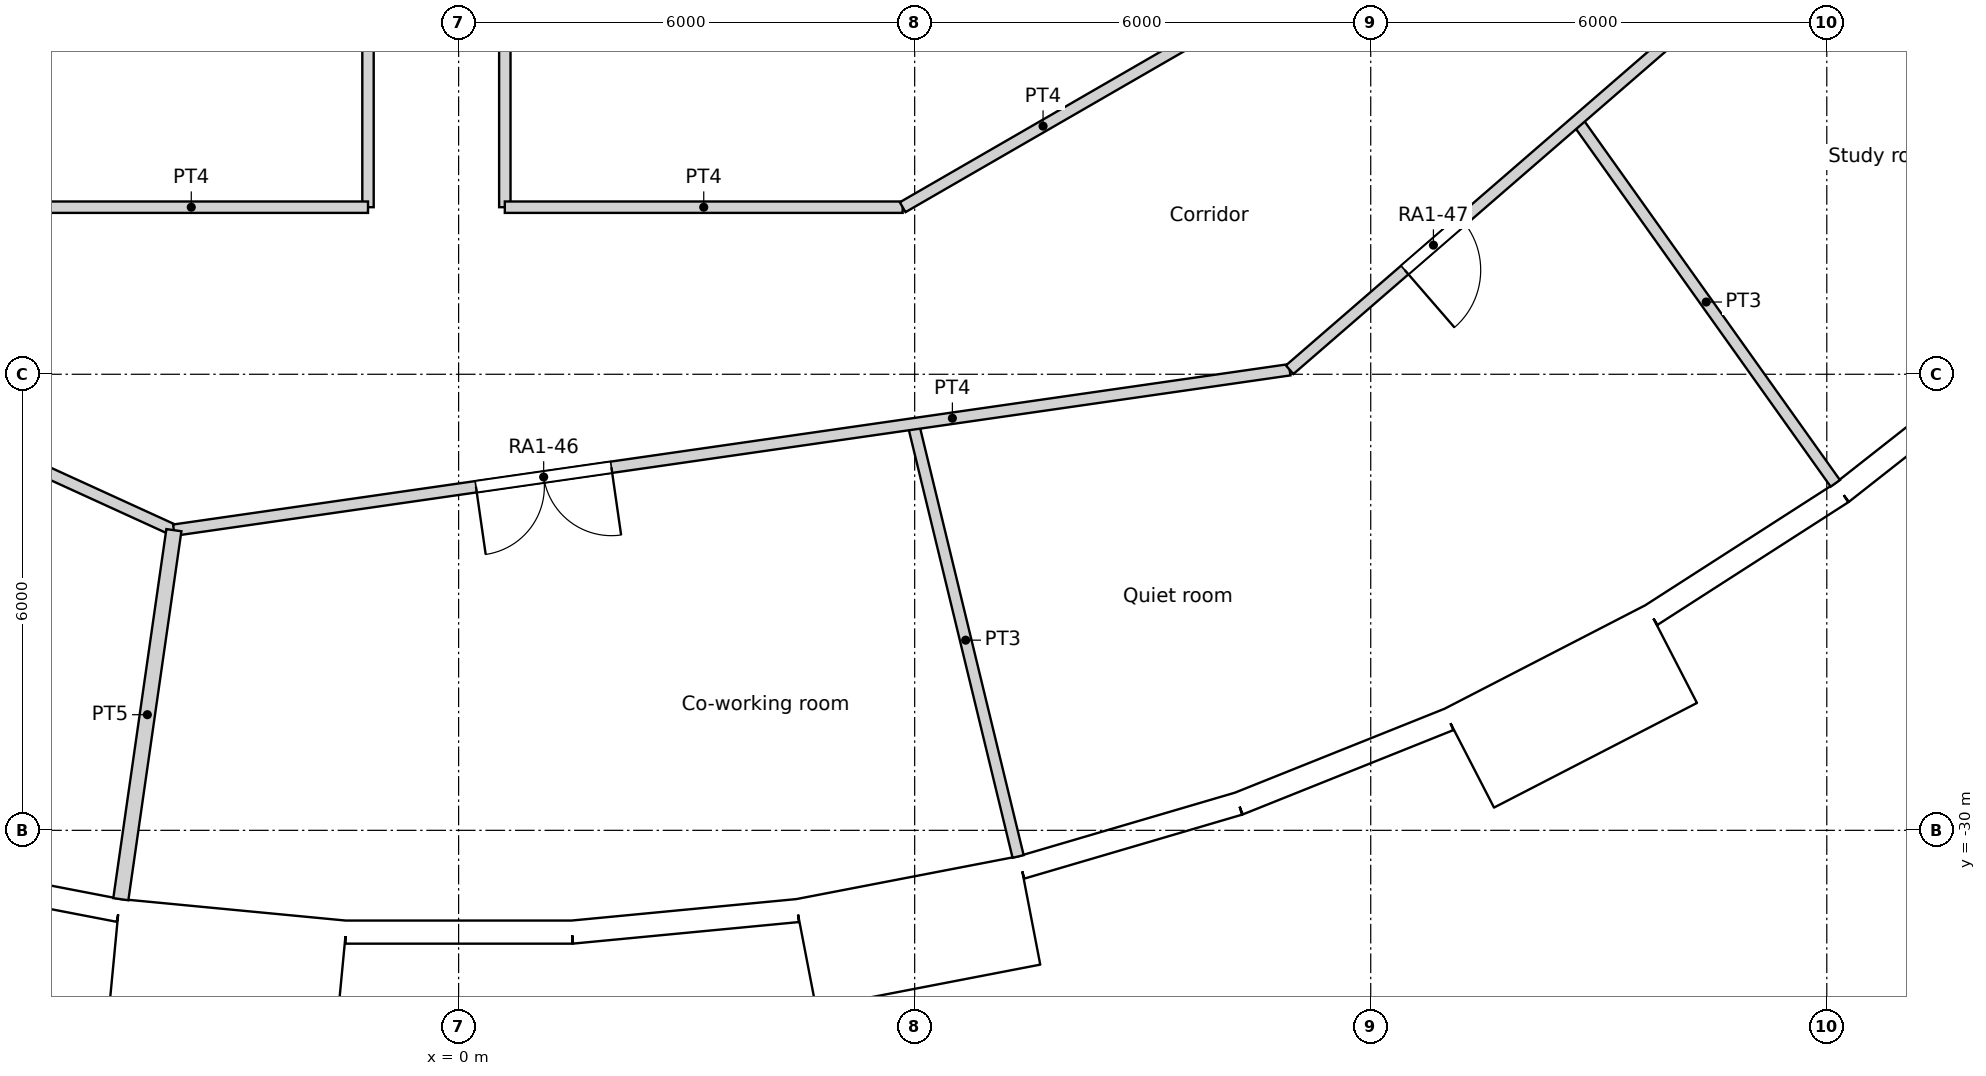
"""IFC4 building model, lengths in metres.
Left out: names, types, materials, properties, quantities, classifications, styles, units other than length and angle.
Written with IfcOpenShell. Run it as: python <this file> out.ifc"""

import sys

from ifc_helpers import new_model, si_unit, direction, frame, frame_2d, origin, origin_2d, place, context, subcontext, project, spatial, rectangle, circle, extrude, element, fill, save


model = new_model("IFC4")
c1 = context("Model", 3, precision=1e-05, world=origin(), true_north=direction((0.0, 1.0)))
c2 = subcontext(c1, "Body", "Model", "MODEL_VIEW")
j1 = project(units=[si_unit("LENGTHUNIT", "METRE"), si_unit("PLANEANGLEUNIT", "RADIAN")], contexts=[c1])
p1 = place(None, origin())
s1 = spatial("IfcSite", under=j1, at=p1, CompositionType="ELEMENT")
p2 = place(p1, origin())
s2 = spatial("IfcBuilding", under=s1, at=p2, CompositionType="ELEMENT")
p3 = place(p2, frame((0.0, 0.0, 28.2)))
s3 = spatial("IfcBuildingStorey", under=s2, at=p3, CompositionType="ELEMENT", Elevation=28.2)
for number, where, z_axis, x_axis in (
    (1, (-4.309, -29.966, 0.0), (0.0, 0.0, 1.0), (1.0, 0.0, 0.0)),
    (2, (1.44, -30.24, 0.0), (0.0, 0.0, 1.0), (1.0, 0.0, 0.0)),
    (3, (7.137, -29.421, 0.0), (0.0, 0.0, 1.0), (1.0, 0.0, 0.0)),
    (4, (12.576, -27.539, 0.0), (0.0, 0.0, 1.0), (1.0, 0.0, 0.0)),
    (5, (17.561, -24.661, 0.0), (0.0, 0.0, 1.0), (1.0, 0.0, 0.0)),
):
    element("IfcColumn", number, at=place(p3, frame(where, z_axis=z_axis, x_axis=x_axis)), inside=s3, PredefinedType="COLUMN", context=c2, shape_type="SweptSolid", body=[
        extrude(circle(Radius=0.7, at=origin_2d()), origin(), (0.0, 0.0, 1.0), 3.6),
    ])
for number, where, z_axis, x_axis in (
    (6, (-1.427, -24.506, 0.0), (0.0, 0.0, 1.0), (1.0, 0.0, 0.0)),
    (7, (4.263, -24.175, 0.0), (0.0, 0.0, 1.0), (1.0, 0.0, 0.0)),
    (8, (9.723, -22.54, 0.0), (0.0, 0.0, 1.0), (1.0, 0.0, 0.0)),
    (9, (14.659, -19.69, 0.0), (0.0, 0.0, 1.0), (1.0, 0.0, 0.0)),
):
    element("IfcColumn", number, at=place(p3, frame(where, z_axis=z_axis, x_axis=x_axis)), inside=s3, PredefinedType="COLUMN", context=c2, shape_type="SweptSolid", body=[
        extrude(circle(Radius=0.75, at=origin_2d()), origin(), (0.0, 0.0, 1.0), 3.6),
    ])
p4 = place(p3, frame((-7.397, -30.49, 0.0), z_axis=(0.0, 0.0, 1.0), x_axis=(0.981924535406, -0.189272836848, 0.0)))
e10 = element("IfcWall", 10, at=p4, inside=s3, PredefinedType="SOLIDWALL", context=c2, shape_type="SweptSolid", body=[
    extrude(rectangle(XDim=2.98, YDim=0.3, at=frame_2d((1.49, 0.0))), origin(), (0.0, 0.0, 1.0), 3.15),
])
p5 = place(p4, frame((1.49, 0.0, 1.55)))
e11 = element("IfcOpeningElement", 11, at=p5, cuts=e10, PredefinedType="OPENING", context=c2, shape_type="SweptSolid", body=[
    extrude(circle(Radius=0.9, at=origin_2d()), frame((0.0, 0.16, 0.0), z_axis=(0.0, -1.0, 0.0), x_axis=(1.0, 0.0, 0.0)), (0.0, 0.0, 1.0), 0.32),
])
p6 = place(p3, frame((-4.527, -31.627, -0.45), z_axis=(0.0, 0.0, 1.0), x_axis=(0.995472768558, -0.09504718333, 0.0)))
e12 = element("IfcWall", 12, at=p6, inside=s3, PredefinedType="ELEMENTEDWALL", context=c2, shape_type="SweptSolid", body=[
    extrude(rectangle(XDim=3.0, YDim=1.45, at=frame_2d((1.5, 0.0))), origin(), (0.0, 0.0, 1.0), 3.6),
])
p7 = place(p6, frame((1.5, 0.0, 2.0)))
e13 = element("IfcOpeningElement", 13, at=p7, cuts=e12, PredefinedType="OPENING", context=c2, shape_type="SweptSolid", body=[
    extrude(circle(Radius=0.9, at=origin_2d()), frame((0.0, 0.735, 0.0), z_axis=(0.0, -1.0, 0.0), x_axis=(1.0, 0.0, 0.0)), (0.0, 0.0, 1.0), 1.47),
])
p8 = place(p3, frame((-1.487, -31.339, 0.0), z_axis=(0.0, 0.0, 1.0), x_axis=(1.0, 0.0, 0.0)))
e14 = element("IfcWall", 14, at=p8, inside=s3, PredefinedType="SOLIDWALL", context=c2, shape_type="SweptSolid", body=[
    extrude(rectangle(XDim=2.98, YDim=0.3, at=frame_2d((1.49, 0.0))), origin(), (0.0, 0.0, 1.0), 3.15),
])
p9 = place(p8, frame((1.49, 0.0, 1.55)))
e15 = element("IfcOpeningElement", 15, at=p9, cuts=e14, PredefinedType="OPENING", context=c2, shape_type="SweptSolid", body=[
    extrude(circle(Radius=0.9, at=origin_2d()), frame((0.0, 0.16, 0.0), z_axis=(0.0, -1.0, 0.0), x_axis=(1.0, 0.0, 0.0)), (0.0, 0.0, 1.0), 0.32),
])
p10 = place(p3, frame((1.493, -31.339, 0.0), z_axis=(0.0, 0.0, 1.0), x_axis=(0.995472611385, 0.095048829468, 0.0)))
e16 = element("IfcWall", 16, at=p10, inside=s3, PredefinedType="SOLIDWALL", context=c2, shape_type="SweptSolid", body=[
    extrude(rectangle(XDim=2.979, YDim=0.3, at=frame_2d((1.49, 0.0))), origin(), (0.0, 0.0, 1.0), 3.15),
])
p11 = place(p10, frame((1.49, 0.0, 1.55)))
e17 = element("IfcOpeningElement", 17, at=p11, cuts=e16, PredefinedType="OPENING", context=c2, shape_type="SweptSolid", body=[
    extrude(circle(Radius=0.9, at=origin_2d()), frame((0.0, 0.16, 0.0), z_axis=(0.0, -1.0, 0.0), x_axis=(1.0, 0.0, 0.0)), (0.0, 0.0, 1.0), 0.32),
])
p12 = place(p3, frame((4.567, -31.621, -0.45), z_axis=(0.0, 0.0, 1.0), x_axis=(0.981921602273, 0.189288052949, 0.0)))
e18 = element("IfcWall", 18, at=p12, inside=s3, PredefinedType="ELEMENTEDWALL", context=c2, shape_type="SweptSolid", body=[
    extrude(rectangle(XDim=3.0, YDim=1.45, at=frame_2d((1.5, 0.0))), origin(), (0.0, 0.0, 1.0), 3.6),
])
p13 = place(p12, frame((1.5, 0.0, 2.0)))
e19 = element("IfcOpeningElement", 19, at=p13, cuts=e18, PredefinedType="OPENING", context=c2, shape_type="SweptSolid", body=[
    extrude(circle(Radius=0.9, at=origin_2d()), frame((0.0, 0.735, 0.0), z_axis=(0.0, -1.0, 0.0), x_axis=(1.0, 0.0, 0.0)), (0.0, 0.0, 1.0), 1.47),
])
p14 = place(p3, frame((7.403, -30.488, 0.0), z_axis=(0.0, 0.0, 1.0), x_axis=(0.959501085144, 0.281704930036, 0.0)))
e20 = element("IfcWall", 20, at=p14, inside=s3, PredefinedType="SOLIDWALL", context=c2, shape_type="SweptSolid", body=[
    extrude(rectangle(XDim=2.979, YDim=0.3, at=frame_2d((1.49, 0.0))), origin(), (0.0, 0.0, 1.0), 3.15),
])
p15 = place(p14, frame((1.49, 0.0, 1.55)))
e21 = element("IfcOpeningElement", 21, at=p15, cuts=e20, PredefinedType="OPENING", context=c2, shape_type="SweptSolid", body=[
    extrude(circle(Radius=0.9, at=origin_2d()), frame((0.0, 0.16, 0.0), z_axis=(0.0, -1.0, 0.0), x_axis=(1.0, 0.0, 0.0)), (0.0, 0.0, 1.0), 0.32),
])
p16 = place(p3, frame((10.261, -29.649, 0.0), z_axis=(0.0, 0.0, 1.0), x_axis=(0.928374947, 0.371644935098, 0.0)))
e22 = element("IfcWall", 22, at=p16, inside=s3, PredefinedType="SOLIDWALL", context=c2, shape_type="SweptSolid", body=[
    extrude(rectangle(XDim=2.98, YDim=0.3, at=frame_2d((1.49, 0.0))), origin(), (0.0, 0.0, 1.0), 3.15),
])
p17 = place(p16, frame((1.49, 0.0, 1.55)))
e23 = element("IfcOpeningElement", 23, at=p17, cuts=e22, PredefinedType="OPENING", context=c2, shape_type="SweptSolid", body=[
    extrude(circle(Radius=0.9, at=origin_2d()), frame((0.0, 0.16, 0.0), z_axis=(0.0, -1.0, 0.0), x_axis=(1.0, 0.0, 0.0)), (0.0, 0.0, 1.0), 0.32),
])
p18 = place(p3, frame((13.291, -29.053, -0.45), z_axis=(0.0, 0.0, 1.0), x_axis=(0.888858064689, 0.458182650083, 0.0)))
e24 = element("IfcWall", 24, at=p18, inside=s3, PredefinedType="ELEMENTEDWALL", context=c2, shape_type="SweptSolid", body=[
    extrude(rectangle(XDim=3.0, YDim=1.45, at=frame_2d((1.5, 0.0))), origin(), (0.0, 0.0, 1.0), 3.6),
])
p19 = place(p18, frame((1.5, 0.0, 2.0)))
e25 = element("IfcOpeningElement", 25, at=p19, cuts=e24, PredefinedType="OPENING", context=c2, shape_type="SweptSolid", body=[
    extrude(circle(Radius=0.9, at=origin_2d()), frame((0.0, 0.735, 0.0), z_axis=(0.0, -1.0, 0.0), x_axis=(1.0, 0.0, 0.0)), (0.0, 0.0, 1.0), 1.47),
])
p20 = place(p3, frame((15.692, -27.168, 0.0), z_axis=(0.0, 0.0, 1.0), x_axis=(0.841260995538, 0.54062920508, 0.0)))
e26 = element("IfcWall", 26, at=p20, inside=s3, PredefinedType="SOLIDWALL", context=c2, shape_type="SweptSolid", body=[
    extrude(rectangle(XDim=2.979, YDim=0.3, at=frame_2d((1.49, 0.0))), origin(), (0.0, 0.0, 1.0), 3.15),
])
p21 = place(p20, frame((1.49, 0.0, 1.55)))
e27 = element("IfcOpeningElement", 27, at=p21, cuts=e26, PredefinedType="OPENING", context=c2, shape_type="SweptSolid", body=[
    extrude(circle(Radius=0.9, at=origin_2d()), frame((0.0, 0.16, 0.0), z_axis=(0.0, -1.0, 0.0), x_axis=(1.0, 0.0, 0.0)), (0.0, 0.0, 1.0), 0.32),
])
p22 = place(p3, frame((18.199, -25.557, 0.0), z_axis=(0.0, 0.0, 1.0), x_axis=(0.786053834673, 0.618158045322, 0.0)))
e28 = element("IfcWall", 28, at=p22, inside=s3, PredefinedType="SOLIDWALL", context=c2, shape_type="SweptSolid", body=[
    extrude(rectangle(XDim=2.979, YDim=0.3, at=frame_2d((1.49, 0.0))), origin(), (0.0, 0.0, 1.0), 3.15),
])
p23 = place(p22, frame((1.49, 0.0, 1.55)))
e29 = element("IfcOpeningElement", 29, at=p23, cuts=e28, PredefinedType="OPENING", context=c2, shape_type="SweptSolid", body=[
    extrude(circle(Radius=0.9, at=origin_2d()), frame((0.0, 0.16, 0.0), z_axis=(0.0, -1.0, 0.0), x_axis=(1.0, 0.0, 0.0)), (0.0, 0.0, 1.0), 0.32),
])
p24 = place(p3, frame((10.933, -23.94, 0.0), z_axis=(0.0, 0.0, 1.0), x_axis=(0.755770011705, 0.654837147242, 0.0)))
e30 = element("IfcWall", 30, at=p24, inside=s3, PredefinedType="PARTITIONING", context=c2, shape_type="SweptSolid", body=[
    extrude(rectangle(XDim=14.83, YDim=0.15, at=frame_2d((7.415, 0.0))), origin(), (0.0, 0.0, 1.0), 3.15),
])
p25 = place(p24, frame((2.003, 0.0, 0.0)))
e31 = element("IfcOpeningElement", 31, at=p25, cuts=e30, PredefinedType="OPENING", context=c2, shape_type="SweptSolid", body=[
    extrude(rectangle(XDim=1.0, YDim=2.04, at=frame_2d((0.5, 1.02))), frame((0.0, 0.075, 0.0), z_axis=(0.0, -1.0, 0.0), x_axis=(1.0, 0.0, 0.0)), (0.0, 0.0, 1.0), 0.15),
])
p26 = place(p3, frame((-5.842, -21.802, 0.0), z_axis=(0.0, 0.0, 1.0), x_axis=(1.0, 0.0, 0.0)))
e32 = element("IfcWall", 32, at=p26, inside=s3, PredefinedType="PARTITIONING", context=c2, shape_type="SweptSolid", body=[
    extrude(rectangle(XDim=4.65, YDim=0.15, at=frame_2d((2.325, 0.0))), origin(), (0.0, 0.0, 1.0), 3.15),
])
p27 = place(p3, frame((-1.192, -21.802, 0.0), z_axis=(0.0, 0.0, 1.0), x_axis=(0.0, 1.0, 0.0)))
e33 = element("IfcWall", 33, at=p27, inside=s3, PredefinedType="PARTITIONING", context=c2, shape_type="SweptSolid", body=[
    extrude(rectangle(XDim=10.002, YDim=0.15, at=frame_2d((5.001, 0.0))), origin(), (0.0, 0.0, 1.0), 3.15),
])
p28 = place(p3, frame((0.608, -21.802, 0.0), z_axis=(0.0, 0.0, 1.0), x_axis=(0.0, 1.0, 0.0)))
e34 = element("IfcWall", 34, at=p28, inside=s3, PredefinedType="PARTITIONING", context=c2, shape_type="SweptSolid", body=[
    extrude(rectangle(XDim=10.002, YDim=0.15, at=frame_2d((5.001, 0.0))), origin(), (0.0, 0.0, 1.0), 3.15),
])
p29 = place(p28, frame((4.526, 0.0, 0.0)))
e35 = element("IfcOpeningElement", 35, at=p29, cuts=e34, PredefinedType="OPENING", context=c2, shape_type="SweptSolid", body=[
    extrude(rectangle(XDim=0.95, YDim=2.1, at=frame_2d((0.475, 1.05))), frame((0.0, 0.075, 0.0), z_axis=(0.0, -1.0, 0.0), x_axis=(1.0, 0.0, 0.0)), (0.0, 0.0, 1.0), 0.15),
])
p30 = place(p3, frame((0.608, -21.802, 0.0), z_axis=(0.0, 0.0, 1.0), x_axis=(1.0, 0.0, 0.0)))
e36 = element("IfcWall", 36, at=p30, inside=s3, PredefinedType="PARTITIONING", context=c2, shape_type="SweptSolid", body=[
    extrude(rectangle(XDim=5.234, YDim=0.15, at=frame_2d((2.617, 0.0))), origin(), (0.0, 0.0, 1.0), 3.15),
])
p31 = place(p3, frame((5.842, -21.802, 0.0), z_axis=(0.0, 0.0, 1.0), x_axis=(0.865983505205, 0.500072563448, 0.0)))
e37 = element("IfcWall", 37, at=p31, inside=s3, PredefinedType="PARTITIONING", context=c2, shape_type="SweptSolid", body=[
    extrude(rectangle(XDim=4.265, YDim=0.15, at=frame_2d((2.133, 0.0))), origin(), (0.0, 0.0, 1.0), 3.15),
])
p32 = place(p3, frame((-17.235, -19.89, 0.0), z_axis=(0.0, 0.0, 1.0), x_axis=(0.90960889055, -0.415465601743, 0.0)))
e38 = element("IfcWall", 38, at=p32, inside=s3, PredefinedType="PARTITIONING", context=c2, shape_type="SweptSolid", body=[
    extrude(rectangle(XDim=14.829, YDim=0.15, at=frame_2d((7.415, 0.0))), origin(), (0.0, 0.0, 1.0), 3.15),
])
p33 = place(p32, frame((6.664, 0.0, 0.0)))
e39 = element("IfcOpeningElement", 39, at=p33, cuts=e38, PredefinedType="OPENING", context=c2, shape_type="SweptSolid", body=[
    extrude(rectangle(XDim=1.5, YDim=2.1, at=frame_2d((0.75, 1.05))), frame((0.0, 0.075, 0.0), z_axis=(0.0, -1.0, 0.0), x_axis=(1.0, 0.0, 0.0)), (0.0, 0.0, 1.0), 0.15),
])
p34 = place(p3, frame((-3.746, -26.051, 0.0), z_axis=(0.0, 0.0, 1.0), x_axis=(0.989823328782, 0.142301713967, 0.0)))
e40 = element("IfcWall", 40, at=p34, inside=s3, PredefinedType="PARTITIONING", context=c2, shape_type="SweptSolid", body=[
    extrude(rectangle(XDim=14.83, YDim=0.15, at=frame_2d((7.415, 0.0))), origin(), (0.0, 0.0, 1.0), 3.15),
])
p35 = place(p34, frame((4.015, 0.0, 0.0)))
e41 = element("IfcOpeningElement", 41, at=p35, cuts=e40, PredefinedType="OPENING", context=c2, shape_type="SweptSolid", body=[
    extrude(rectangle(XDim=1.8, YDim=2.1, at=frame_2d((0.9, 1.05))), frame((0.0, 0.075, 0.0), z_axis=(0.0, -1.0, 0.0), x_axis=(1.0, 0.0, 0.0)), (0.0, 0.0, 1.0), 0.15),
])
p36 = place(p3, frame((-4.444, -30.906, 0.0), z_axis=(0.0, 0.0, 1.0), x_axis=(0.142306296561, 0.989822669956, 0.0)))
e42 = element("IfcWall", 42, at=p36, inside=s3, PredefinedType="PARTITIONING", context=c2, shape_type="SweptSolid", body=[
    extrude(rectangle(XDim=4.905, YDim=0.2, at=frame_2d((2.452, 0.0))), origin(), (0.0, 0.0, 1.0), 3.15),
])
p37 = place(p3, frame((5.981, -24.652, 0.0), z_axis=(0.0, 0.0, 1.0), x_axis=(0.235644168604, -0.971839403298, 0.0)))
e43 = element("IfcWall", 43, at=p37, inside=s3, PredefinedType="PARTITIONING", context=c2, shape_type="SweptSolid", body=[
    extrude(rectangle(XDim=5.857, YDim=0.15, at=frame_2d((2.928, 0.0))), origin(), (0.0, 0.0, 1.0), 3.15),
])
p38 = place(p3, frame((14.715, -20.664, 0.0), z_axis=(0.0, 0.0, 1.0), x_axis=(0.580007254017, -0.814611309329, 0.0)))
e44 = element("IfcWall", 44, at=p38, inside=s3, PredefinedType="PARTITIONING", context=c2, shape_type="SweptSolid", body=[
    extrude(rectangle(XDim=5.857, YDim=0.15, at=frame_2d((2.928, 0.0))), origin(), (0.0, 0.0, 1.0), 3.15),
])
p39 = place(p5, origin())
e45 = element("IfcWindow", 45, at=p39, inside=s3, PartitioningType="SINGLE_PANEL", PredefinedType="WINDOW", context=c2, shape_type="SweptSolid", body=[
    extrude(circle(Radius=0.9, at=origin_2d()), frame((0.0, 0.12, 0.0), z_axis=(0.0, -1.0, 0.0), x_axis=(1.0, 0.0, 0.0)), (0.0, 0.0, 1.0), 0.1),
])
fill(e11, e45)
p40 = place(p7, origin())
e46 = element("IfcWindow", 46, at=p40, inside=s3, PartitioningType="SINGLE_PANEL", PredefinedType="WINDOW", context=c2, shape_type="SweptSolid", body=[
    extrude(circle(Radius=0.9, at=origin_2d()), frame((0.0, 0.695, 0.0), z_axis=(0.0, -1.0, 0.0), x_axis=(1.0, 0.0, 0.0)), (0.0, 0.0, 1.0), 0.1),
])
fill(e13, e46)
p41 = place(p9, origin())
e47 = element("IfcWindow", 47, at=p41, inside=s3, PartitioningType="SINGLE_PANEL", PredefinedType="WINDOW", context=c2, shape_type="SweptSolid", body=[
    extrude(circle(Radius=0.9, at=origin_2d()), frame((0.0, 0.12, 0.0), z_axis=(0.0, -1.0, 0.0), x_axis=(1.0, 0.0, 0.0)), (0.0, 0.0, 1.0), 0.1),
])
fill(e15, e47)
p42 = place(p11, origin())
e48 = element("IfcWindow", 48, at=p42, inside=s3, PartitioningType="SINGLE_PANEL", PredefinedType="WINDOW", context=c2, shape_type="SweptSolid", body=[
    extrude(circle(Radius=0.9, at=origin_2d()), frame((0.0, 0.12, 0.0), z_axis=(0.0, -1.0, 0.0), x_axis=(1.0, 0.0, 0.0)), (0.0, 0.0, 1.0), 0.1),
])
fill(e17, e48)
p43 = place(p13, origin())
e49 = element("IfcWindow", 49, at=p43, inside=s3, PartitioningType="SINGLE_PANEL", PredefinedType="WINDOW", context=c2, shape_type="SweptSolid", body=[
    extrude(circle(Radius=0.9, at=origin_2d()), frame((0.0, 0.695, 0.0), z_axis=(0.0, -1.0, 0.0), x_axis=(1.0, 0.0, 0.0)), (0.0, 0.0, 1.0), 0.1),
])
fill(e19, e49)
p44 = place(p15, origin())
e50 = element("IfcWindow", 50, at=p44, inside=s3, PartitioningType="SINGLE_PANEL", PredefinedType="WINDOW", context=c2, shape_type="SweptSolid", body=[
    extrude(circle(Radius=0.9, at=origin_2d()), frame((0.0, 0.12, 0.0), z_axis=(0.0, -1.0, 0.0), x_axis=(1.0, 0.0, 0.0)), (0.0, 0.0, 1.0), 0.1),
])
fill(e21, e50)
p45 = place(p17, origin())
e51 = element("IfcWindow", 51, at=p45, inside=s3, PartitioningType="SINGLE_PANEL", PredefinedType="WINDOW", context=c2, shape_type="SweptSolid", body=[
    extrude(circle(Radius=0.9, at=origin_2d()), frame((0.0, 0.12, 0.0), z_axis=(0.0, -1.0, 0.0), x_axis=(1.0, 0.0, 0.0)), (0.0, 0.0, 1.0), 0.1),
])
fill(e23, e51)
p46 = place(p19, origin())
e52 = element("IfcWindow", 52, at=p46, inside=s3, PartitioningType="SINGLE_PANEL", PredefinedType="WINDOW", context=c2, shape_type="SweptSolid", body=[
    extrude(circle(Radius=0.9, at=origin_2d()), frame((0.0, 0.695, 0.0), z_axis=(0.0, -1.0, 0.0), x_axis=(1.0, 0.0, 0.0)), (0.0, 0.0, 1.0), 0.1),
])
fill(e25, e52)
p47 = place(p21, origin())
e53 = element("IfcWindow", 53, at=p47, inside=s3, PartitioningType="SINGLE_PANEL", PredefinedType="WINDOW", context=c2, shape_type="SweptSolid", body=[
    extrude(circle(Radius=0.9, at=origin_2d()), frame((0.0, 0.12, 0.0), z_axis=(0.0, -1.0, 0.0), x_axis=(1.0, 0.0, 0.0)), (0.0, 0.0, 1.0), 0.1),
])
fill(e27, e53)
p48 = place(p23, origin())
e54 = element("IfcWindow", 54, at=p48, inside=s3, PartitioningType="SINGLE_PANEL", PredefinedType="WINDOW", context=c2, shape_type="SweptSolid", body=[
    extrude(circle(Radius=0.9, at=origin_2d()), frame((0.0, 0.12, 0.0), z_axis=(0.0, -1.0, 0.0), x_axis=(1.0, 0.0, 0.0)), (0.0, 0.0, 1.0), 0.1),
])
fill(e29, e54)
p49 = place(p35, origin())
e55 = element("IfcDoor", 55, at=p49, inside=s3, OperationType="DOUBLE_DOOR_SINGLE_SWING", PredefinedType="DOOR", context=c2, shape_type="SweptSolid", body=[
    extrude(rectangle(XDim=1.8, YDim=2.1, at=frame_2d((0.9, 1.05))), frame((0.0, 0.025, 0.0), z_axis=(0.0, -1.0, 0.0), x_axis=(1.0, 0.0, 0.0)), (0.0, 0.0, 1.0), 0.05),
])
fill(e41, e55)
p50 = place(p25, origin())
e56 = element("IfcDoor", 56, at=p50, inside=s3, OperationType="SINGLE_SWING_RIGHT", PredefinedType="DOOR", context=c2, shape_type="SweptSolid", body=[
    extrude(rectangle(XDim=1.0, YDim=2.04, at=frame_2d((0.5, 1.02))), frame((0.0, 0.025, 0.0), z_axis=(0.0, -1.0, 0.0), x_axis=(1.0, 0.0, 0.0)), (0.0, 0.0, 1.0), 0.05),
])
fill(e31, e56)
save(model, sys.argv[1])
